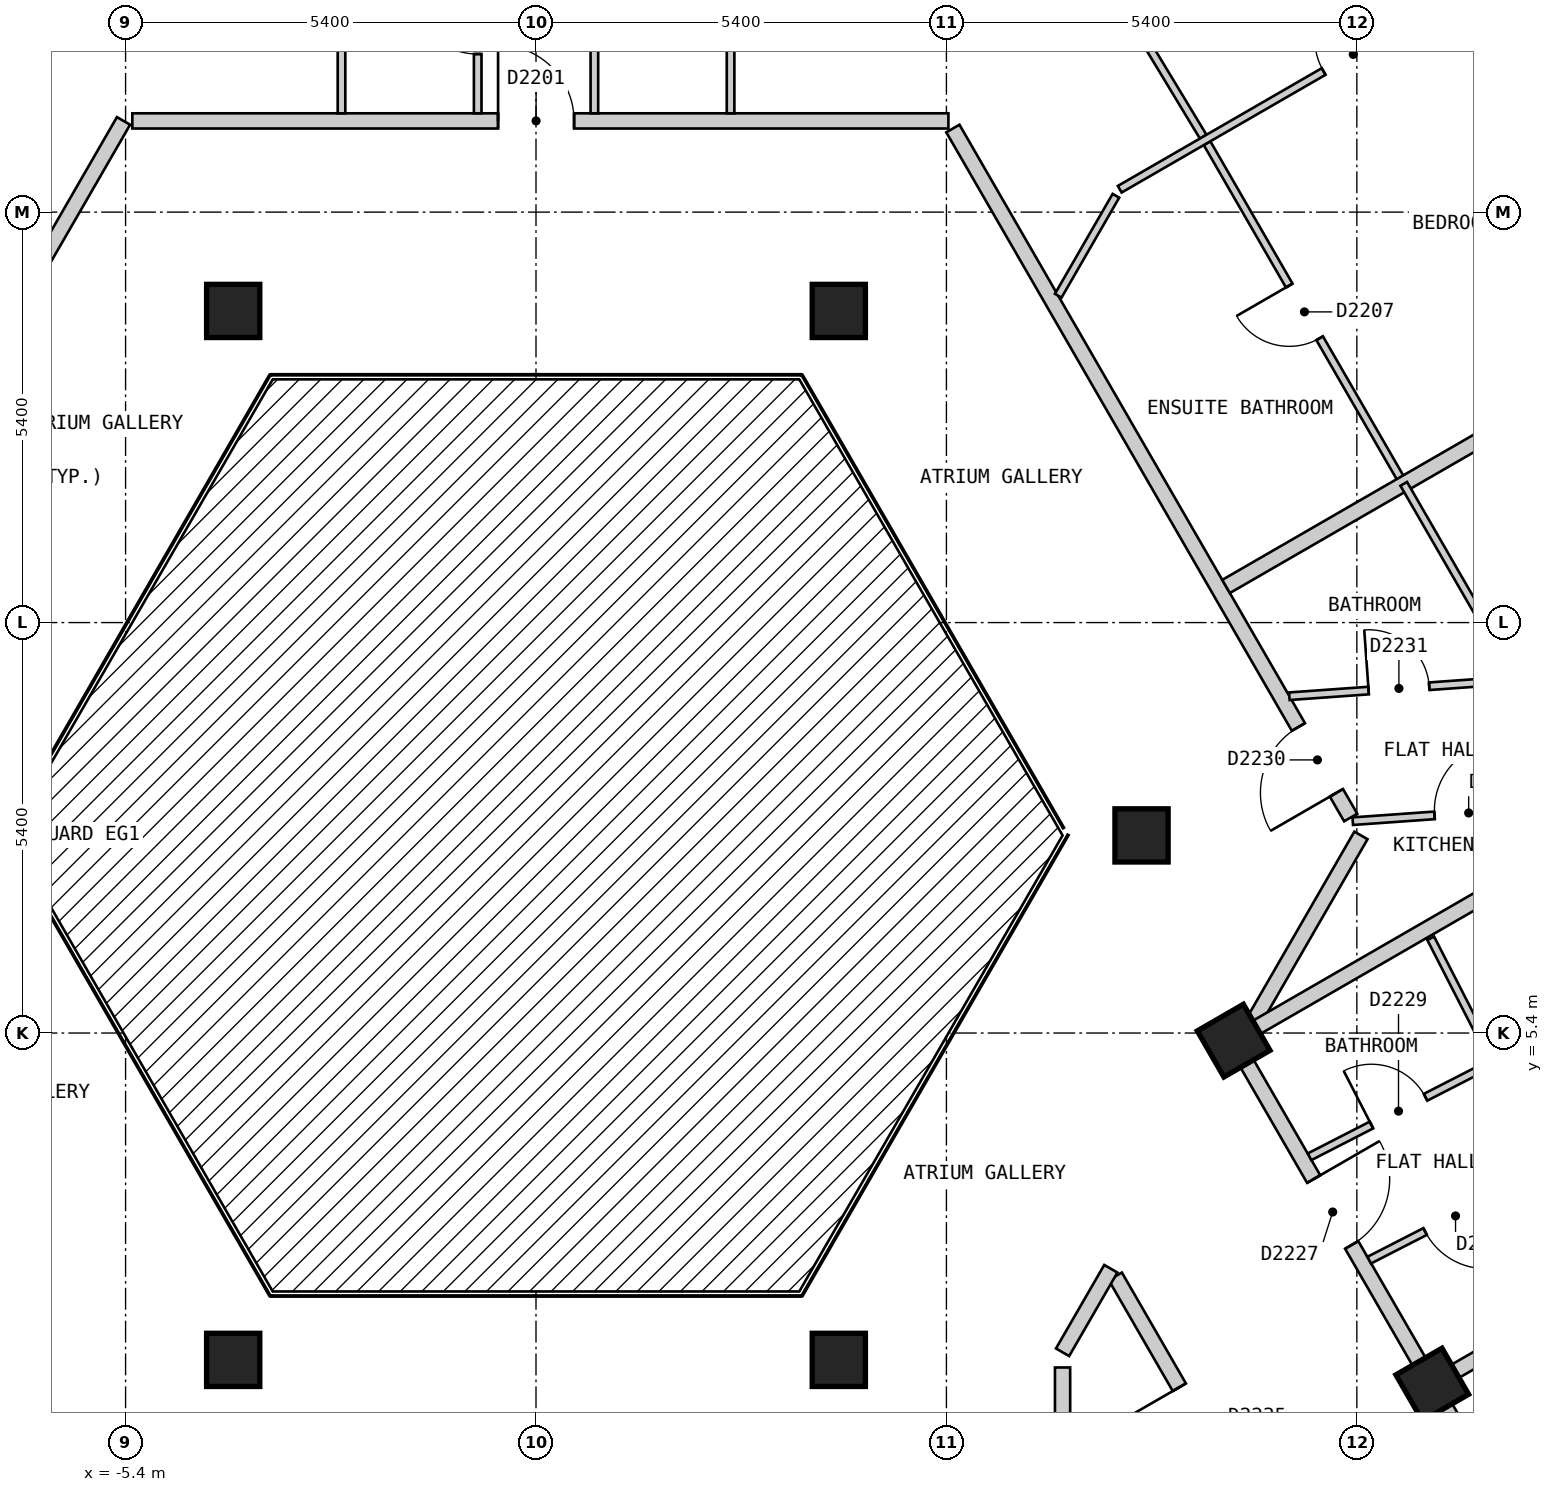
"""IFC4 building model, lengths in metres.
Left out: names, types, materials, properties, quantities, classifications, styles, units other than length and angle.
Written with IfcOpenShell. Run it as: python <this file> out.ifc"""

import sys

from ifc_helpers import new_model, si_unit, direction, frame, frame_2d, origin, origin_2d, place, context, subcontext, project, spatial, rectangle, extrude, element, fill, save


model = new_model("IFC4")
c1 = context("Model", 3, precision=1e-05, world=origin(), true_north=direction((0.0, 1.0)))
c2 = subcontext(c1, "Body", "Model", "MODEL_VIEW")
j1 = project(units=[si_unit("LENGTHUNIT", "METRE"), si_unit("PLANEANGLEUNIT", "RADIAN")], contexts=[c1])
p1 = place(None, origin())
s1 = spatial("IfcSite", under=j1, at=p1, CompositionType="ELEMENT")
p2 = place(p1, origin())
s2 = spatial("IfcBuilding", under=s1, at=p2, CompositionType="ELEMENT")
p3 = place(p2, frame((0.0, 0.0, 229.8)))
s3 = spatial("IfcBuildingStorey", under=s2, at=p3, CompositionType="ELEMENT", Elevation=229.8)
for number, where, z_axis, x_axis in (
    (1, (11.792, 0.775, 0.0), (0.0, 0.0, 1.0), (-0.5, 0.866, 0.0)),
    (2, (3.984, 1.1, 0.0), (0.0, 0.0, 1.0), (1.0, 0.0, 0.0)),
    (3, (9.179, 5.3, 0.0), (0.0, 0.0, 1.0), (-0.5, 0.866, 0.0)),
    (4, (7.967, 8.0, 0.0), (0.0, 0.0, 1.0), (1.0, 0.0, 0.0)),
    (5, (3.984, 14.9, 0.0), (0.0, 0.0, 1.0), (1.0, 0.0, 0.0)),
    (6, (-3.984, 14.9, 0.0), (0.0, 0.0, 1.0), (1.0, 0.0, 0.0)),
    (7, (-3.984, 1.1, 0.0), (0.0, 0.0, 1.0), (1.0, 0.0, 0.0)),
):
    element("IfcColumn", number, at=place(p3, frame(where, z_axis=z_axis, x_axis=x_axis)), inside=s3, PredefinedType="COLUMN", context=c2, shape_type="SweptSolid", body=[
        extrude(rectangle(XDim=0.7, YDim=0.7, at=origin_2d()), origin(), (0.0, 0.0, 1.0), 3.0),
    ])
p4 = place(p3, frame((7.622, 2.199, 0.0), z_axis=(0.0, 0.0, 1.0), x_axis=(0.499994660107, -0.866028486751, 0.0)))
e8 = element("IfcWall", 8, at=p4, inside=s3, PredefinedType="PARTITIONING", context=c2, shape_type="SweptSolid", body=[
    extrude(rectangle(XDim=4.27, YDim=0.2, at=frame_2d((2.135, 0.0))), origin(), (0.0, 0.0, 1.0), 2.7),
])
p5 = place(p4, frame((1.685, 0.0, 0.0)))
e9 = element("IfcOpeningElement", 9, at=p5, cuts=e8, PredefinedType="OPENING", context=c2, shape_type="SweptSolid", body=[
    extrude(rectangle(XDim=0.9, YDim=2.1, at=frame_2d((0.45, 1.05))), frame((0.0, 0.11, 0.0), z_axis=(0.0, -1.0, 0.0), x_axis=(1.0, 0.0, 0.0)), (0.0, 0.0, 1.0), 0.22),
])
p6 = place(p3, frame((9.238, 5.2, 0.0), z_axis=(0.0, 0.0, 1.0), x_axis=(0.500025705601, -0.86601056214, 0.0)))
e10 = element("IfcWall", 10, at=p6, inside=s3, PredefinedType="PARTITIONING", context=c2, shape_type="SweptSolid", body=[
    extrude(rectangle(XDim=7.735, YDim=0.2, at=frame_2d((3.868, 0.0))), origin(), (0.0, 0.0, 1.0), 2.7),
])
p7 = place(p6, frame((6.898, 0.0, 0.0)))
e11 = element("IfcOpeningElement", 11, at=p7, cuts=e10, PredefinedType="OPENING", context=c2, shape_type="SweptSolid", body=[
    extrude(rectangle(XDim=0.8, YDim=2.1, at=frame_2d((0.4, 1.05))), frame((0.0, 0.11, 0.0), z_axis=(0.0, -1.0, 0.0), x_axis=(1.0, 0.0, 0.0)), (0.0, 0.0, 1.0), 0.22),
])
p8 = place(p6, frame((1.988, 0.0, 0.0)))
e12 = element("IfcOpeningElement", 12, at=p8, cuts=e10, PredefinedType="OPENING", context=c2, shape_type="SweptSolid", body=[
    extrude(rectangle(XDim=1.0, YDim=2.1, at=frame_2d((0.5, 1.05))), frame((0.0, 0.11, 0.0), z_axis=(0.0, -1.0, 0.0), x_axis=(1.0, 0.0, 0.0)), (0.0, 0.0, 1.0), 0.22),
])
p9 = place(p3, frame((5.485, 17.3, 0.0), z_axis=(0.0, 0.0, 1.0), x_axis=(0.500017221754, -0.866015460572, 0.0)))
e13 = element("IfcWall", 13, at=p9, inside=s3, PredefinedType="PARTITIONING", context=c2, shape_type="SweptSolid", body=[
    extrude(rectangle(XDim=10.468, YDim=0.2, at=frame_2d((5.234, 0.0))), origin(), (0.0, 0.0, 1.0), 2.7),
])
p10 = place(p9, frame((9.092, 0.0, 0.0)))
e14 = element("IfcOpeningElement", 14, at=p10, cuts=e13, PredefinedType="OPENING", context=c2, shape_type="SweptSolid", body=[
    extrude(rectangle(XDim=1.0, YDim=2.1, at=frame_2d((0.5, 1.05))), frame((0.0, 0.11, 0.0), z_axis=(0.0, -1.0, 0.0), x_axis=(1.0, 0.0, 0.0)), (0.0, 0.0, 1.0), 0.22),
])
p11 = place(p3, frame((6.928, 1.0, 0.0), z_axis=(0.0, 0.0, 1.0), x_axis=(0.0, -1.0, 0.0)))
e15 = element("IfcWall", 15, at=p11, inside=s3, PredefinedType="PARTITIONING", context=c2, shape_type="SweptSolid", body=[
    extrude(rectangle(XDim=3.199, YDim=0.2, at=frame_2d((1.6, 0.0))), origin(), (0.0, 0.0, 1.0), 2.7),
])
p12 = place(p3, frame((-5.311, 17.4, 0.0), z_axis=(0.0, 0.0, 1.0), x_axis=(1.0, 0.0, 0.0)))
e16 = element("IfcWall", 16, at=p12, inside=s3, PredefinedType="PARTITIONING", context=c2, shape_type="SweptSolid", body=[
    extrude(rectangle(XDim=10.737, YDim=0.2, at=frame_2d((5.369, 0.0))), origin(), (0.0, 0.0, 1.0), 2.7),
])
p13 = place(p12, frame((4.812, 0.0, 0.0)))
e17 = element("IfcOpeningElement", 17, at=p13, cuts=e16, PredefinedType="OPENING", context=c2, shape_type="SweptSolid", body=[
    extrude(rectangle(XDim=1.0, YDim=2.1, at=frame_2d((0.5, 1.05))), frame((0.0, 0.11, 0.0), z_axis=(0.0, -1.0, 0.0), x_axis=(1.0, 0.0, 0.0)), (0.0, 0.0, 1.0), 0.22),
])
p14 = place(p3, frame((6.928, 1.2, 0.0), z_axis=(0.0, 0.0, 1.0), x_axis=(0.500255167297, 0.865878032746, 0.0)))
e18 = element("IfcWall", 18, at=p14, inside=s3, PredefinedType="PARTITIONING", context=c2, shape_type="SweptSolid", body=[
    extrude(rectangle(XDim=1.269, YDim=0.2, at=frame_2d((0.635, 0.0))), origin(), (0.0, 0.0, 1.0), 2.7),
])
p15 = place(p3, frame((9.354, 5.401, 0.0), z_axis=(0.0, 0.0, 1.0), x_axis=(0.499849222119, 0.866112437936, 0.0)))
e19 = element("IfcWall", 19, at=p15, inside=s3, PredefinedType="PARTITIONING", context=c2, shape_type="SweptSolid", body=[
    extrude(rectangle(XDim=3.001, YDim=0.2, at=frame_2d((1.5, 0.0))), origin(), (0.0, 0.0, 1.0), 2.7),
])
p16 = place(p3, frame((-10.854, 8.0, 0.0), z_axis=(0.0, 0.0, 1.0), x_axis=(0.499997637144, 0.866026767976, 0.0)))
e20 = element("IfcWall", 20, at=p16, inside=s3, PredefinedType="PARTITIONING", context=c2, shape_type="SweptSolid", body=[
    extrude(rectangle(XDim=10.854, YDim=0.2, at=frame_2d((5.427, 0.0))), origin(), (0.0, 0.0, 1.0), 2.7),
])
p17 = place(p3, frame((7.033, 20.077, 0.0), z_axis=(0.0, 0.0, 1.0), x_axis=(0.517730137343, -0.855543981854, 0.0)))
e21 = element("IfcWall", 21, at=p17, inside=s3, PredefinedType="PARTITIONING", context=c2, shape_type="SweptSolid", body=[
    extrude(rectangle(XDim=3.371, YDim=0.1, at=frame_2d((1.685, 0.0))), origin(), (0.0, 0.0, 1.0), 2.7),
])
p18 = place(p3, frame((8.829, 17.107, 0.0), z_axis=(0.0, 0.0, 1.0), x_axis=(0.500035512416, -0.866004899711, 0.0)))
e22 = element("IfcWall", 22, at=p18, inside=s3, PredefinedType="PARTITIONING", context=c2, shape_type="SweptSolid", body=[
    extrude(rectangle(XDim=5.175, YDim=0.1, at=frame_2d((2.588, 0.0))), origin(), (0.0, 0.0, 1.0), 2.7),
])
p19 = place(p18, frame((2.163, 0.0, 0.0)))
e23 = element("IfcOpeningElement", 23, at=p19, cuts=e22, PredefinedType="OPENING", context=c2, shape_type="SweptSolid", body=[
    extrude(rectangle(XDim=0.8, YDim=2.1, at=frame_2d((0.4, 1.05))), frame((0.0, 0.06, 0.0), z_axis=(0.0, -1.0, 0.0), x_axis=(1.0, 0.0, 0.0)), (0.0, 0.0, 1.0), 0.12),
])
p20 = place(p3, frame((11.772, 6.646, 0.0), z_axis=(0.0, 0.0, 1.0), x_axis=(0.456175983405, -0.889889584254, 0.0)))
e24 = element("IfcWall", 24, at=p20, inside=s3, PredefinedType="PARTITIONING", context=c2, shape_type="SweptSolid", body=[
    extrude(rectangle(XDim=3.348, YDim=0.1, at=frame_2d((1.674, 0.0))), origin(), (0.0, 0.0, 1.0), 2.7),
])
p21 = place(p3, frame((-2.559, 20.17, 0.0), z_axis=(0.0, 0.0, 1.0), x_axis=(0.0, -1.0, 0.0)))
e25 = element("IfcWall", 25, at=p21, inside=s3, PredefinedType="PARTITIONING", context=c2, shape_type="SweptSolid", body=[
    extrude(rectangle(XDim=2.67, YDim=0.1, at=frame_2d((1.335, 0.0))), origin(), (0.0, 0.0, 1.0), 2.7),
])
p22 = place(p3, frame((2.56, 20.03, 0.0), z_axis=(0.0, 0.0, 1.0), x_axis=(0.0, -1.0, 0.0)))
e26 = element("IfcWall", 26, at=p22, inside=s3, PredefinedType="PARTITIONING", context=c2, shape_type="SweptSolid", body=[
    extrude(rectangle(XDim=2.53, YDim=0.1, at=frame_2d((1.265, 0.0))), origin(), (0.0, 0.0, 1.0), 2.7),
])
p23 = place(p3, frame((6.871, 15.1, 0.0), z_axis=(0.0, 0.0, 1.0), x_axis=(0.499805980977, 0.866137391745, 0.0)))
e27 = element("IfcWall", 27, at=p23, inside=s3, PredefinedType="PARTITIONING", context=c2, shape_type="SweptSolid", body=[
    extrude(rectangle(XDim=1.518, YDim=0.1, at=frame_2d((0.759, 0.0))), origin(), (0.0, 0.0, 1.0), 2.7),
])
p24 = place(p3, frame((0.768, 17.5, 0.0), z_axis=(0.0, 0.0, 1.0), x_axis=(0.0, 1.0, 0.0)))
e28 = element("IfcWall", 28, at=p24, inside=s3, PredefinedType="PARTITIONING", context=c2, shape_type="SweptSolid", body=[
    extrude(rectangle(XDim=2.51, YDim=0.1, at=frame_2d((1.255, 0.0))), origin(), (0.0, 0.0, 1.0), 2.7),
])
p25 = place(p24, frame((0.83, 0.0, 0.0)))
e29 = element("IfcOpeningElement", 29, at=p25, cuts=e28, PredefinedType="OPENING", context=c2, shape_type="SweptSolid", body=[
    extrude(rectangle(XDim=0.8, YDim=2.1, at=frame_2d((0.4, 1.05))), frame((0.0, 0.06, 0.0), z_axis=(0.0, -1.0, 0.0), x_axis=(1.0, 0.0, 0.0)), (0.0, 0.0, 1.0), 0.12),
])
p26 = place(p3, frame((-0.767, 17.5, 0.0), z_axis=(0.0, 0.0, 1.0), x_axis=(0.0, 1.0, 0.0)))
e30 = element("IfcWall", 30, at=p26, inside=s3, PredefinedType="PARTITIONING", context=c2, shape_type="SweptSolid", body=[
    extrude(rectangle(XDim=2.559, YDim=0.1, at=frame_2d((1.28, 0.0))), origin(), (0.0, 0.0, 1.0), 2.7),
])
p27 = place(p26, frame((0.78, 0.0, 0.0)))
e31 = element("IfcOpeningElement", 31, at=p27, cuts=e30, PredefinedType="OPENING", context=c2, shape_type="SweptSolid", body=[
    extrude(rectangle(XDim=0.9, YDim=2.1, at=frame_2d((0.45, 1.05))), frame((0.0, 0.06, 0.0), z_axis=(0.0, -1.0, 0.0), x_axis=(1.0, 0.0, 0.0)), (0.0, 0.0, 1.0), 0.12),
])
p28 = place(p3, frame((10.178, 3.772, 0.0), z_axis=(0.0, 0.0, 1.0), x_axis=(0.889732071959, 0.456483121405, 0.0)))
e32 = element("IfcWall", 32, at=p28, inside=s3, PredefinedType="PARTITIONING", context=c2, shape_type="SweptSolid", body=[
    extrude(rectangle(XDim=2.679, YDim=0.1, at=frame_2d((1.34, 0.0))), origin(), (0.0, 0.0, 1.0), 2.7),
])
p29 = place(p28, frame((0.915, 0.0, 0.0)))
e33 = element("IfcOpeningElement", 33, at=p29, cuts=e32, PredefinedType="OPENING", context=c2, shape_type="SweptSolid", body=[
    extrude(rectangle(XDim=0.8, YDim=2.1, at=frame_2d((0.4, 1.05))), frame((0.0, 0.06, 0.0), z_axis=(0.0, -1.0, 0.0), x_axis=(1.0, 0.0, 0.0)), (0.0, 0.0, 1.0), 0.12),
])
p30 = place(p3, frame((10.963, 2.412, 0.0), z_axis=(0.0, 0.0, 1.0), x_axis=(0.889943997558, 0.456069820543, 0.0)))
e34 = element("IfcWall", 34, at=p30, inside=s3, PredefinedType="PARTITIONING", context=c2, shape_type="SweptSolid", body=[
    extrude(rectangle(XDim=2.651, YDim=0.1, at=frame_2d((1.325, 0.0))), origin(), (0.0, 0.0, 1.0), 2.7),
])
p31 = place(p30, frame((0.826, 0.0, 0.0)))
e35 = element("IfcOpeningElement", 35, at=p31, cuts=e34, PredefinedType="OPENING", context=c2, shape_type="SweptSolid", body=[
    extrude(rectangle(XDim=0.9, YDim=2.1, at=frame_2d((0.45, 1.05))), frame((0.0, 0.06, 0.0), z_axis=(0.0, -1.0, 0.0), x_axis=(1.0, 0.0, 0.0)), (0.0, 0.0, 1.0), 0.12),
])
p32 = place(p3, frame((7.68, 16.501, 0.0), z_axis=(0.0, 0.0, 1.0), x_axis=(0.86602149507, 0.500006770031, 0.0)))
e36 = element("IfcWall", 36, at=p32, inside=s3, PredefinedType="PARTITIONING", context=c2, shape_type="SweptSolid", body=[
    extrude(rectangle(XDim=5.798, YDim=0.1, at=frame_2d((2.899, 0.0))), origin(), (0.0, 0.0, 1.0), 2.7),
])
p33 = place(p32, frame((3.098, 0.0, 0.0)))
e37 = element("IfcOpeningElement", 37, at=p33, cuts=e36, PredefinedType="OPENING", context=c2, shape_type="SweptSolid", body=[
    extrude(rectangle(XDim=0.9, YDim=2.1, at=frame_2d((0.45, 1.05))), frame((0.0, 0.06, 0.0), z_axis=(0.0, -1.0, 0.0), x_axis=(1.0, 0.0, 0.0)), (0.0, 0.0, 1.0), 0.12),
])
p34 = place(p3, frame((10.746, 8.187, 0.0), z_axis=(0.0, 0.0, 1.0), x_axis=(0.997477310687, 0.070986017387, 0.0)))
e38 = element("IfcWall", 38, at=p34, inside=s3, PredefinedType="PARTITIONING", context=c2, shape_type="SweptSolid", body=[
    extrude(rectangle(XDim=3.058, YDim=0.1, at=frame_2d((1.529, 0.0))), origin(), (0.0, 0.0, 1.0), 2.7),
])
p35 = place(p34, frame((1.079, 0.0, 0.0)))
e39 = element("IfcOpeningElement", 39, at=p35, cuts=e38, PredefinedType="OPENING", context=c2, shape_type="SweptSolid", body=[
    extrude(rectangle(XDim=0.9, YDim=2.1, at=frame_2d((0.45, 1.05))), frame((0.0, 0.06, 0.0), z_axis=(0.0, -1.0, 0.0), x_axis=(1.0, 0.0, 0.0)), (0.0, 0.0, 1.0), 0.12),
])
p36 = place(p3, frame((9.912, 9.831, 0.0), z_axis=(0.0, 0.0, 1.0), x_axis=(0.997459937941, 0.071229714326, 0.0)))
e40 = element("IfcWall", 40, at=p36, inside=s3, PredefinedType="PARTITIONING", context=c2, shape_type="SweptSolid", body=[
    extrude(rectangle(XDim=3.002, YDim=0.1, at=frame_2d((1.501, 0.0))), origin(), (0.0, 0.0, 1.0), 2.7),
])
p37 = place(p36, frame((1.045, 0.0, 0.0)))
e41 = element("IfcOpeningElement", 41, at=p37, cuts=e40, PredefinedType="OPENING", context=c2, shape_type="SweptSolid", body=[
    extrude(rectangle(XDim=0.8, YDim=2.1, at=frame_2d((0.4, 1.05))), frame((0.0, 0.06, 0.0), z_axis=(0.0, -1.0, 0.0), x_axis=(1.0, 0.0, 0.0)), (0.0, 0.0, 1.0), 0.12),
])
p38 = place(p3, frame((11.879, 0.826, 0.0), z_axis=(0.0, 0.0, 1.0), x_axis=(0.866065245018, 0.499930986609, 0.0)))
e42 = element("IfcWall", 42, at=p38, inside=s3, PredefinedType="PARTITIONING", context=c2, shape_type="SweptSolid", body=[
    extrude(rectangle(XDim=10.0, YDim=0.2, at=frame_2d((5.0, 0.0))), origin(), (0.0, 0.0, 1.0), 2.7),
])
p39 = place(p3, frame((9.457, 5.461, 0.0), z_axis=(0.0, 0.0, 1.0), x_axis=(0.866043818878, 0.499968102766, 0.0)))
e43 = element("IfcWall", 43, at=p39, inside=s3, PredefinedType="PARTITIONING", context=c2, shape_type="SweptSolid", body=[
    extrude(rectangle(XDim=9.779, YDim=0.2, at=frame_2d((4.89, 0.0))), origin(), (0.0, 0.0, 1.0), 2.7),
])
p40 = place(p3, frame((9.079, 11.275, 0.0), z_axis=(0.0, 0.0, 1.0), x_axis=(0.866001485781, 0.500041424909, 0.0)))
e44 = element("IfcWall", 44, at=p40, inside=s3, PredefinedType="PARTITIONING", context=c2, shape_type="SweptSolid", body=[
    extrude(rectangle(XDim=7.2, YDim=0.2, at=frame_2d((3.6, 0.0))), origin(), (0.0, 0.0, 1.0), 2.7),
])
p41 = place(p3, frame((11.417, 12.625, 0.0), z_axis=(0.0, 0.0, 1.0), x_axis=(0.500055103712, -0.865993587304, 0.0)))
e45 = element("IfcWall", 45, at=p41, inside=s3, PredefinedType="PARTITIONING", context=c2, shape_type="SweptSolid", body=[
    extrude(rectangle(XDim=2.944, YDim=0.1, at=frame_2d((1.472, 0.0))), origin(), (0.0, 0.0, 1.0), 2.7),
])
p42 = place(p13, origin())
e46 = element("IfcDoor", 46, at=p42, inside=s3, OperationType="SINGLE_SWING_LEFT", PredefinedType="DOOR", context=c2, shape_type="SweptSolid", body=[
    extrude(rectangle(XDim=1.0, YDim=2.1, at=frame_2d((0.5, 1.05))), frame((0.0, 0.025, 0.0), z_axis=(0.0, -1.0, 0.0), x_axis=(1.0, 0.0, 0.0)), (0.0, 0.0, 1.0), 0.05),
])
fill(e17, e46)
p43 = place(p27, origin())
e47 = element("IfcDoor", 47, at=p43, inside=s3, OperationType="SINGLE_SWING_RIGHT", PredefinedType="DOOR", context=c2, shape_type="SweptSolid", body=[
    extrude(rectangle(XDim=0.9, YDim=2.1, at=frame_2d((0.45, 1.05))), frame((0.0, 0.025, 0.0), z_axis=(0.0, -1.0, 0.0), x_axis=(1.0, 0.0, 0.0)), (0.0, 0.0, 1.0), 0.05),
])
fill(e31, e47)
p44 = place(p33, origin())
e48 = element("IfcDoor", 48, at=p44, inside=s3, OperationType="SINGLE_SWING_RIGHT", PredefinedType="DOOR", context=c2, shape_type="SweptSolid", body=[
    extrude(rectangle(XDim=0.9, YDim=2.1, at=frame_2d((0.45, 1.05))), frame((0.0, 0.025, 0.0), z_axis=(0.0, -1.0, 0.0), x_axis=(1.0, 0.0, 0.0)), (0.0, 0.0, 1.0), 0.05),
])
fill(e37, e48)
p45 = place(p19, origin())
e49 = element("IfcDoor", 49, at=p45, inside=s3, OperationType="SINGLE_SWING_LEFT", PredefinedType="DOOR", context=c2, shape_type="SweptSolid", body=[
    extrude(rectangle(XDim=0.8, YDim=2.1, at=frame_2d((0.4, 1.05))), frame((0.0, 0.025, 0.0), z_axis=(0.0, -1.0, 0.0), x_axis=(1.0, 0.0, 0.0)), (0.0, 0.0, 1.0), 0.05),
])
fill(e23, e49)
p46 = place(p8, origin())
e50 = element("IfcDoor", 50, at=p46, inside=s3, OperationType="SINGLE_SWING_LEFT", PredefinedType="DOOR", context=c2, shape_type="SweptSolid", body=[
    extrude(rectangle(XDim=1.0, YDim=2.1, at=frame_2d((0.5, 1.05))), frame((0.0, 0.025, 0.0), z_axis=(0.0, -1.0, 0.0), x_axis=(1.0, 0.0, 0.0)), (0.0, 0.0, 1.0), 0.05),
])
fill(e12, e50)
p47 = place(p31, origin())
e51 = element("IfcDoor", 51, at=p47, inside=s3, OperationType="SINGLE_SWING_RIGHT", PredefinedType="DOOR", context=c2, shape_type="SweptSolid", body=[
    extrude(rectangle(XDim=0.9, YDim=2.1, at=frame_2d((0.45, 1.05))), frame((0.0, 0.025, 0.0), z_axis=(0.0, -1.0, 0.0), x_axis=(1.0, 0.0, 0.0)), (0.0, 0.0, 1.0), 0.05),
])
fill(e35, e51)
p48 = place(p29, origin())
e52 = element("IfcDoor", 52, at=p48, inside=s3, OperationType="SINGLE_SWING_LEFT", PredefinedType="DOOR", context=c2, shape_type="SweptSolid", body=[
    extrude(rectangle(XDim=0.8, YDim=2.1, at=frame_2d((0.4, 1.05))), frame((0.0, 0.025, 0.0), z_axis=(0.0, -1.0, 0.0), x_axis=(1.0, 0.0, 0.0)), (0.0, 0.0, 1.0), 0.05),
])
fill(e33, e52)
p49 = place(p10, origin())
e53 = element("IfcDoor", 53, at=p49, inside=s3, OperationType="SINGLE_SWING_RIGHT", PredefinedType="DOOR", context=c2, shape_type="SweptSolid", body=[
    extrude(rectangle(XDim=1.0, YDim=2.1, at=frame_2d((0.5, 1.05))), frame((0.0, 0.025, 0.0), z_axis=(0.0, -1.0, 0.0), x_axis=(1.0, 0.0, 0.0)), (0.0, 0.0, 1.0), 0.05),
])
fill(e14, e53)
p50 = place(p37, origin())
e54 = element("IfcDoor", 54, at=p50, inside=s3, OperationType="SINGLE_SWING_LEFT", PredefinedType="DOOR", context=c2, shape_type="SweptSolid", body=[
    extrude(rectangle(XDim=0.8, YDim=2.1, at=frame_2d((0.4, 1.05))), frame((0.0, 0.025, 0.0), z_axis=(0.0, -1.0, 0.0), x_axis=(1.0, 0.0, 0.0)), (0.0, 0.0, 1.0), 0.05),
])
fill(e41, e54)
p51 = place(p35, origin())
e55 = element("IfcDoor", 55, at=p51, inside=s3, OperationType="SINGLE_SWING_RIGHT", PredefinedType="DOOR", context=c2, shape_type="SweptSolid", body=[
    extrude(rectangle(XDim=0.9, YDim=2.1, at=frame_2d((0.45, 1.05))), frame((0.0, 0.025, 0.0), z_axis=(0.0, -1.0, 0.0), x_axis=(1.0, 0.0, 0.0)), (0.0, 0.0, 1.0), 0.05),
])
fill(e39, e55)
p52 = place(p5, origin())
e56 = element("IfcDoor", 56, at=p52, inside=s3, OperationType="SINGLE_SWING_LEFT", PredefinedType="DOOR", context=c2, shape_type="SweptSolid", body=[
    extrude(rectangle(XDim=0.9, YDim=2.1, at=frame_2d((0.45, 1.05))), frame((0.0, 0.025, 0.0), z_axis=(0.0, -1.0, 0.0), x_axis=(1.0, 0.0, 0.0)), (0.0, 0.0, 1.0), 0.05),
])
fill(e9, e56)
save(model, sys.argv[1])
